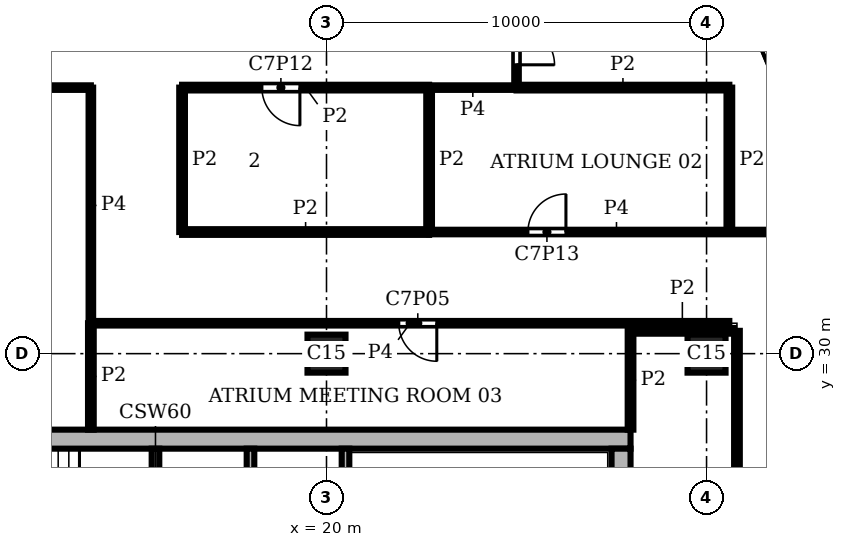
"""IFC4 building model, lengths in metres.
Left out: names, types, materials, properties, quantities, classifications, styles, units other than length and angle.
Written with IfcOpenShell. Run it as: python <this file> out.ifc"""

import sys

from ifc_helpers import new_model, si_unit, direction, frame, frame_2d, origin, origin_2d, place, context, subcontext, project, spatial, rectangle, extrude, element, fill, save


model = new_model("IFC4")
c1 = context("Model", 3, precision=1e-05, world=origin(), true_north=direction((0.0, 1.0)))
c2 = subcontext(c1, "Body", "Model", "MODEL_VIEW")
j1 = project(units=[si_unit("LENGTHUNIT", "METRE"), si_unit("PLANEANGLEUNIT", "RADIAN")], contexts=[c1])
p1 = place(None, origin())
s1 = spatial("IfcSite", under=j1, at=p1, CompositionType="ELEMENT")
p2 = place(p1, origin())
s2 = spatial("IfcBuilding", under=s1, at=p2, CompositionType="ELEMENT")
p3 = place(p2, frame((0.0, 0.0, 313.8)))
s3 = spatial("IfcBuildingStorey", under=s2, at=p3, CompositionType="ELEMENT", Elevation=313.8)
for number, where, z_axis, x_axis in (
    (1, (20.0, 30.0, 0.0), (0.0, 0.0, 1.0), (1.0, 0.0, 0.0)),
    (2, (30.0, 30.0, 0.0), (0.0, 0.0, 1.0), (1.0, 0.0, 0.0)),
):
    element("IfcColumn", number, at=place(p3, frame(where, z_axis=z_axis, x_axis=x_axis)), inside=s3, PredefinedType="COLUMN", context=c2, shape_type="SweptSolid", body=[
        extrude(rectangle(XDim=1.0, YDim=1.0, at=origin_2d()), origin(), (0.0, 0.0, 1.0), 3.9),
    ])
p4 = place(p3, frame((27.75, 8.5, 0.0), z_axis=(0.0, 0.0, 1.0), x_axis=(0.0, 1.0, 0.0)))
e3 = element("IfcWall", 3, at=p4, inside=s3, PredefinedType="SHEAR", context=c2, shape_type="SweptSolid", body=[
    extrude(rectangle(XDim=19.0, YDim=0.5, at=frame_2d((9.5, 0.0))), origin(), (0.0, 0.0, 1.0), 3.9),
])
p5 = place(p4, frame((4.95, 0.0, 0.0)))
e4 = element("IfcOpeningElement", 4, at=p5, cuts=e3, PredefinedType="OPENING", context=c2, shape_type="SweptSolid", body=[
    extrude(rectangle(XDim=1.6, YDim=2.1, at=frame_2d((0.8, 1.05))), frame((0.0, 0.26, 0.0), z_axis=(0.0, -1.0, 0.0), x_axis=(1.0, 0.0, 0.0)), (0.0, 0.0, 1.0), 0.52),
])
p6 = place(p3, frame((28.0, 27.75, 0.0), z_axis=(0.0, 0.0, 1.0), x_axis=(-1.0, 0.0, 0.0)))
e5 = element("IfcWall", 5, at=p6, inside=s3, PredefinedType="SHEAR", context=c2, shape_type="SweptSolid", body=[
    extrude(rectangle(XDim=20.0, YDim=0.5, at=frame_2d((10.0, 0.0))), origin(), (0.0, 0.0, 1.0), 3.9),
])
p7 = place(p3, frame((33.362, 33.974, 0.0), z_axis=(0.0, 0.0, 1.0), x_axis=(-0.382655745237, 0.923891000409, 0.0)))
e6 = element("IfcWall", 6, at=p7, inside=s3, PredefinedType="SOLIDWALL", context=c2, shape_type="SweptSolid", body=[
    extrude(rectangle(XDim=6.053, YDim=0.4, at=frame_2d((3.027, 0.0))), origin(), (0.0, 0.0, 1.0), 3.9),
])
p8 = place(p7, frame((0.227, 0.0, 0.9)))
e7 = element("IfcOpeningElement", 7, at=p8, cuts=e6, PredefinedType="OPENING", context=c2, shape_type="SweptSolid", body=[
    extrude(rectangle(XDim=5.6, YDim=2.35, at=frame_2d((2.8, 1.175))), frame((0.0, 0.21, 0.0), z_axis=(0.0, -1.0, 0.0), x_axis=(1.0, 0.0, 0.0)), (0.0, 0.0, 1.0), 0.42),
])
p9 = place(p3, frame((15.5, 23.6, 0.0), z_axis=(0.0, 0.0, 1.0), x_axis=(0.0, 1.0, 0.0)))
e8 = element("IfcWall", 8, at=p9, inside=s3, PredefinedType="SHEAR", context=c2, shape_type="SweptSolid", body=[
    extrude(rectangle(XDim=3.9, YDim=0.2, at=frame_2d((1.95, 0.0))), origin(), (0.0, 0.0, 1.0), 3.58),
])
p10 = place(p3, frame((18.0, 20.0, 0.0), z_axis=(0.0, 0.0, 1.0), x_axis=(0.0, 1.0, 0.0)))
e9 = element("IfcWall", 9, at=p10, inside=s3, PredefinedType="SHEAR", context=c2, shape_type="SweptSolid", body=[
    extrude(rectangle(XDim=7.5, YDim=0.2, at=frame_2d((3.75, 0.0))), origin(), (0.0, 0.0, 1.0), 3.58),
])
p11 = place(p10, frame((1.2, 0.0, 0.0)))
e10 = element("IfcOpeningElement", 10, at=p11, cuts=e9, PredefinedType="OPENING", context=c2, shape_type="SweptSolid", body=[
    extrude(rectangle(XDim=1.2, YDim=2.1, at=frame_2d((0.6, 1.05))), frame((0.0, 0.11, 0.0), z_axis=(0.0, -1.0, 0.0), x_axis=(1.0, 0.0, 0.0)), (0.0, 0.0, 1.0), 0.22),
])
p12 = place(p3, frame((20.5, 23.6, 0.0), z_axis=(0.0, 0.0, 1.0), x_axis=(0.0, 1.0, 0.0)))
e11 = element("IfcWall", 11, at=p12, inside=s3, PredefinedType="SHEAR", context=c2, shape_type="SweptSolid", body=[
    extrude(rectangle(XDim=3.9, YDim=0.2, at=frame_2d((1.95, 0.0))), origin(), (0.0, 0.0, 1.0), 3.58),
])
p13 = place(p3, frame((13.8, 28.0, 0.0), z_axis=(0.0, 0.0, 1.0), x_axis=(0.0, 1.0, 0.0)))
e12 = element("IfcWall", 12, at=p13, inside=s3, PredefinedType="PARTITIONING", context=c2, shape_type="SweptSolid", body=[
    extrude(rectangle(XDim=2.8, YDim=0.15, at=frame_2d((1.4, 0.0))), origin(), (0.0, 0.0, 1.0), 3.58),
])
for number, where, z_axis, x_axis in (
    (13, (16.2, 33.2, 0.0), (0.0, 0.0, 1.0), (0.0, 1.0, 0.0)),
    (14, (22.7, 33.2, 0.0), (0.0, 0.0, 1.0), (0.0, 1.0, 0.0)),
):
    element("IfcWall", number, at=place(p3, frame(where, z_axis=z_axis, x_axis=x_axis)), inside=s3, PredefinedType="PARTITIONING", context=c2, shape_type="SweptSolid", body=[
        extrude(rectangle(XDim=3.8, YDim=0.15, at=frame_2d((1.9, 0.0))), origin(), (0.0, 0.0, 1.0), 3.58),
    ])
p14 = place(p3, frame((28.0, 28.0, 0.0), z_axis=(0.0, 0.0, 1.0), x_axis=(0.0, 1.0, 0.0)))
e15 = element("IfcWall", 15, at=p14, inside=s3, PredefinedType="PARTITIONING", context=c2, shape_type="SweptSolid", body=[
    extrude(rectangle(XDim=2.598, YDim=0.15, at=frame_2d((1.299, 0.0))), origin(), (0.0, 0.0, 1.0), 3.58),
])
p15 = place(p3, frame((30.6, 33.2, 0.0), z_axis=(0.0, 0.0, 1.0), x_axis=(0.0, 1.0, 0.0)))
e16 = element("IfcWall", 16, at=p15, inside=s3, PredefinedType="PARTITIONING", context=c2, shape_type="SweptSolid", body=[
    extrude(rectangle(XDim=3.8, YDim=0.15, at=frame_2d((1.9, 0.0))), origin(), (0.0, 0.0, 1.0), 3.58),
])
p16 = place(p3, frame((30.8, 19.95, 0.0), z_axis=(0.0, 0.0, 1.0), x_axis=(0.0, 1.0, 0.0)))
e17 = element("IfcWall", 17, at=p16, inside=s3, PredefinedType="PARTITIONING", context=c2, shape_type="SweptSolid", body=[
    extrude(rectangle(XDim=10.65, YDim=0.15, at=frame_2d((5.325, 0.0))), origin(), (0.0, 0.0, 1.0), 3.58),
])
p17 = place(p16, frame((4.85, 0.0, 0.0)))
e18 = element("IfcOpeningElement", 18, at=p17, cuts=e17, PredefinedType="OPENING", context=c2, shape_type="SweptSolid", body=[
    extrude(rectangle(XDim=1.0, YDim=2.1, at=frame_2d((0.5, 1.05))), frame((0.0, 0.085, 0.0), z_axis=(0.0, -1.0, 0.0), x_axis=(1.0, 0.0, 0.0)), (0.0, 0.0, 1.0), 0.17),
])
p18 = place(p3, frame((28.002, 30.6, 0.0), z_axis=(0.0, 0.0, 1.0), x_axis=(1.0, 0.0, 0.0)))
e19 = element("IfcWall", 19, at=p18, inside=s3, PredefinedType="PARTITIONING", context=c2, shape_type="SweptSolid", body=[
    extrude(rectangle(XDim=2.723, YDim=0.15, at=frame_2d((1.362, 0.0))), origin(), (0.0, 0.0, 1.0), 3.58),
])
p19 = place(p3, frame((16.2, 33.2, 0.0), z_axis=(0.0, 0.0, 1.0), x_axis=(1.0, 0.0, 0.0)))
e20 = element("IfcWall", 20, at=p19, inside=s3, PredefinedType="PARTITIONING", context=c2, shape_type="SweptSolid", body=[
    extrude(rectangle(XDim=6.5, YDim=0.15, at=frame_2d((3.25, 0.0))), origin(), (0.0, 0.0, 1.0), 3.58),
])
p20 = place(p3, frame((16.2, 37.0, 0.0), z_axis=(0.0, 0.0, 1.0), x_axis=(1.0, 0.0, 0.0)))
e21 = element("IfcWall", 21, at=p20, inside=s3, PredefinedType="PARTITIONING", context=c2, shape_type="SweptSolid", body=[
    extrude(rectangle(XDim=6.5, YDim=0.15, at=frame_2d((3.25, 0.0))), origin(), (0.0, 0.0, 1.0), 3.58),
])
p21 = place(p20, frame((2.1, 0.0, 0.0)))
e22 = element("IfcOpeningElement", 22, at=p21, cuts=e21, PredefinedType="OPENING", context=c2, shape_type="SweptSolid", body=[
    extrude(rectangle(XDim=1.0, YDim=2.1, at=frame_2d((0.5, 1.05))), frame((0.0, 0.085, 0.0), z_axis=(0.0, -1.0, 0.0), x_axis=(1.0, 0.0, 0.0)), (0.0, 0.0, 1.0), 0.17),
])
p22 = place(p3, frame((25.0, 37.0, 0.0), z_axis=(0.0, 0.0, 1.0), x_axis=(1.0, 0.0, 0.0)))
e23 = element("IfcWall", 23, at=p22, inside=s3, PredefinedType="PARTITIONING", context=c2, shape_type="SweptSolid", body=[
    extrude(rectangle(XDim=5.6, YDim=0.15, at=frame_2d((2.8, 0.0))), origin(), (0.0, 0.0, 1.0), 3.58),
])
p23 = place(p3, frame((13.8, 30.8, 0.0), z_axis=(0.0, 0.0, 1.0), x_axis=(0.0, 1.0, 0.0)))
e24 = element("IfcWall", 24, at=p23, inside=s3, PredefinedType="PARTITIONING", context=c2, shape_type="SweptSolid", body=[
    extrude(rectangle(XDim=6.2, YDim=0.12, at=frame_2d((3.1, 0.0))), origin(), (0.0, 0.0, 1.0), 3.58),
])
p24 = place(p3, frame((25.0, 37.0, 0.0), z_axis=(0.0, 0.0, 1.0), x_axis=(0.0, 1.0, 0.0)))
e25 = element("IfcWall", 25, at=p24, inside=s3, PredefinedType="PARTITIONING", context=c2, shape_type="SweptSolid", body=[
    extrude(rectangle(XDim=2.4, YDim=0.12, at=frame_2d((1.2, 0.0))), origin(), (0.0, 0.0, 1.0), 3.58),
])
p25 = place(p24, frame((0.6, 0.0, 0.0)))
e26 = element("IfcOpeningElement", 26, at=p25, cuts=e25, PredefinedType="OPENING", context=c2, shape_type="SweptSolid", body=[
    extrude(rectangle(XDim=1.0, YDim=2.1, at=frame_2d((0.5, 1.05))), frame((0.0, 0.07, 0.0), z_axis=(0.0, -1.0, 0.0), x_axis=(1.0, 0.0, 0.0)), (0.0, 0.0, 1.0), 0.14),
])
p26 = place(p3, frame((13.802, 30.8, 0.0), z_axis=(0.0, 0.0, 1.0), x_axis=(1.0, 0.0, 0.0)))
e27 = element("IfcWall", 27, at=p26, inside=s3, PredefinedType="PARTITIONING", context=c2, shape_type="SweptSolid", body=[
    extrude(rectangle(XDim=16.797, YDim=0.12, at=frame_2d((8.398, 0.0))), origin(), (0.0, 0.0, 1.0), 3.58),
])
p27 = place(p26, frame((8.1, 0.0, 0.0)))
e28 = element("IfcOpeningElement", 28, at=p27, cuts=e27, PredefinedType="OPENING", context=c2, shape_type="SweptSolid", body=[
    extrude(rectangle(XDim=1.0, YDim=2.1, at=frame_2d((0.5, 1.05))), frame((0.0, 0.07, 0.0), z_axis=(0.0, -1.0, 0.0), x_axis=(1.0, 0.0, 0.0)), (0.0, 0.0, 1.0), 0.14),
])
p28 = place(p3, frame((22.7, 33.2, 0.0), z_axis=(0.0, 0.0, 1.0), x_axis=(1.0, 0.0, 0.0)))
e29 = element("IfcWall", 29, at=p28, inside=s3, PredefinedType="PARTITIONING", context=c2, shape_type="SweptSolid", body=[
    extrude(rectangle(XDim=9.86, YDim=0.12, at=frame_2d((4.93, 0.0))), origin(), (0.0, 0.0, 1.0), 3.58),
])
p29 = place(p28, frame((2.6, 0.0, 0.0)))
e30 = element("IfcOpeningElement", 30, at=p29, cuts=e29, PredefinedType="OPENING", context=c2, shape_type="SweptSolid", body=[
    extrude(rectangle(XDim=1.0, YDim=2.1, at=frame_2d((0.5, 1.05))), frame((0.0, 0.07, 0.0), z_axis=(0.0, -1.0, 0.0), x_axis=(1.0, 0.0, 0.0)), (0.0, 0.0, 1.0), 0.14),
])
p30 = place(p3, frame((5.0, 37.0, 0.0), z_axis=(0.0, 0.0, 1.0), x_axis=(1.0, 0.0, 0.0)))
e31 = element("IfcWall", 31, at=p30, inside=s3, PredefinedType="PARTITIONING", context=c2, shape_type="SweptSolid", body=[
    extrude(rectangle(XDim=8.8, YDim=0.12, at=frame_2d((4.4, 0.0))), origin(), (0.0, 0.0, 1.0), 3.58),
])
p31 = place(p30, frame((4.35, 0.0, 0.0)))
e32 = element("IfcOpeningElement", 32, at=p31, cuts=e31, PredefinedType="OPENING", context=c2, shape_type="SweptSolid", body=[
    extrude(rectangle(XDim=1.8, YDim=2.1, at=frame_2d((0.9, 1.05))), frame((0.0, 0.07, 0.0), z_axis=(0.0, -1.0, 0.0), x_axis=(1.0, 0.0, 0.0)), (0.0, 0.0, 1.0), 0.14),
])
p32 = place(p3, frame((22.7, 37.0, 0.0), z_axis=(0.0, 0.0, 1.0), x_axis=(1.0, 0.0, 0.0)))
e33 = element("IfcWall", 33, at=p32, inside=s3, PredefinedType="PARTITIONING", context=c2, shape_type="SweptSolid", body=[
    extrude(rectangle(XDim=2.3, YDim=0.12, at=frame_2d((1.15, 0.0))), origin(), (0.0, 0.0, 1.0), 3.58),
])
p33 = place(p8, origin())
e34 = element("IfcWindow", 34, at=p33, inside=s3, PartitioningType="SINGLE_PANEL", PredefinedType="WINDOW", context=c2, shape_type="SweptSolid", body=[
    extrude(rectangle(XDim=5.6, YDim=2.35, at=frame_2d((2.8, 1.175))), frame((0.0, 0.16, 0.0), z_axis=(0.0, -1.0, 0.0), x_axis=(1.0, 0.0, 0.0)), (0.0, 0.0, 1.0), 0.06),
])
fill(e7, e34)
p34 = place(p25, frame((1.0, 0.0, 0.0), z_axis=(0.0, 0.0, 1.0), x_axis=(-1.0, 0.0, 0.0)))
e35 = element("IfcDoor", 35, at=p34, inside=s3, OperationType="SINGLE_SWING_RIGHT", PredefinedType="DOOR", context=c2, shape_type="SweptSolid", body=[
    extrude(rectangle(XDim=1.0, YDim=2.1, at=frame_2d((0.5, 1.05))), frame((0.0, 0.025, 0.0), z_axis=(0.0, -1.0, 0.0), x_axis=(1.0, 0.0, 0.0)), (0.0, 0.0, 1.0), 0.05),
])
fill(e26, e35)
p35 = place(p27, frame((1.0, 0.0, 0.0), z_axis=(0.0, 0.0, 1.0), x_axis=(-1.0, 0.0, 0.0)))
e36 = element("IfcDoor", 36, at=p35, inside=s3, OperationType="SINGLE_SWING_LEFT", PredefinedType="DOOR", context=c2, shape_type="SweptSolid", body=[
    extrude(rectangle(XDim=1.0, YDim=2.1, at=frame_2d((0.5, 1.05))), frame((0.0, 0.025, 0.0), z_axis=(0.0, -1.0, 0.0), x_axis=(1.0, 0.0, 0.0)), (0.0, 0.0, 1.0), 0.05),
])
fill(e28, e36)
p36 = place(p21, frame((1.0, 0.0, 0.0), z_axis=(0.0, 0.0, 1.0), x_axis=(-1.0, 0.0, 0.0)))
e37 = element("IfcDoor", 37, at=p36, inside=s3, OperationType="SINGLE_SWING_LEFT", PredefinedType="DOOR", context=c2, shape_type="SweptSolid", body=[
    extrude(rectangle(XDim=1.0, YDim=2.1, at=frame_2d((0.5, 1.05))), frame((0.0, 0.025, 0.0), z_axis=(0.0, -1.0, 0.0), x_axis=(1.0, 0.0, 0.0)), (0.0, 0.0, 1.0), 0.05),
])
fill(e22, e37)
p37 = place(p29, origin())
e38 = element("IfcDoor", 38, at=p37, inside=s3, OperationType="SINGLE_SWING_RIGHT", PredefinedType="DOOR", context=c2, shape_type="SweptSolid", body=[
    extrude(rectangle(XDim=1.0, YDim=2.1, at=frame_2d((0.5, 1.05))), frame((0.0, 0.025, 0.0), z_axis=(0.0, -1.0, 0.0), x_axis=(1.0, 0.0, 0.0)), (0.0, 0.0, 1.0), 0.05),
])
fill(e30, e38)
save(model, sys.argv[1])
